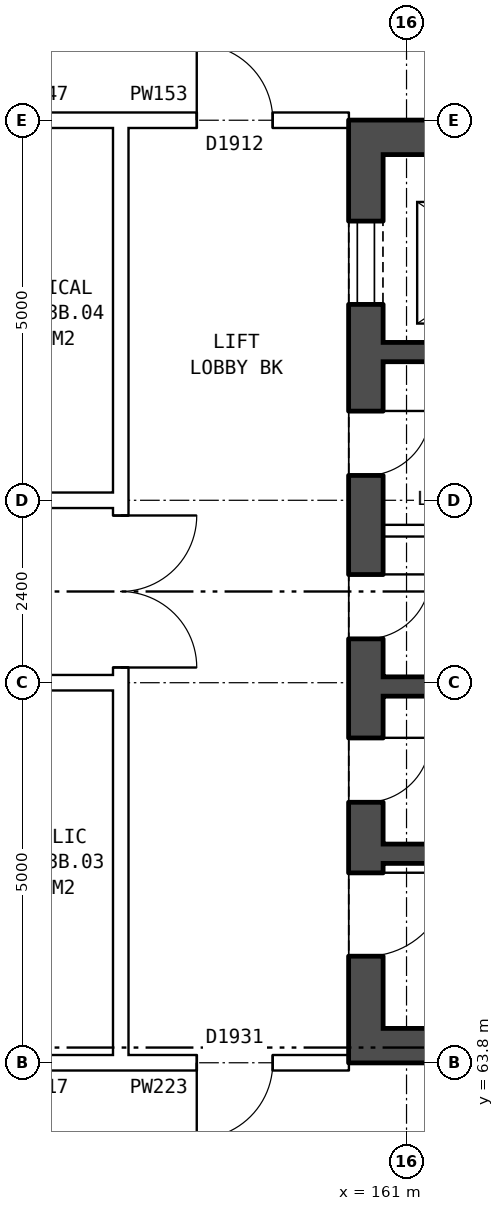
"""IFC4 building model, lengths in metres.
Left out: names, types, materials, properties, quantities, classifications, styles, units other than length and angle.
Written with IfcOpenShell. Run it as: python <this file> out.ifc"""

import sys

from ifc_helpers import new_model, si_unit, direction, frame, frame_2d, origin, place, context, subcontext, project, spatial, rectangle, extrude, element, fill, save


model = new_model("IFC4")
c1 = context("Model", 3, precision=1e-05, world=origin(), true_north=direction((0.0, 1.0)))
c2 = subcontext(c1, "Body", "Model", "MODEL_VIEW")
j1 = project(units=[si_unit("LENGTHUNIT", "METRE"), si_unit("PLANEANGLEUNIT", "RADIAN")], contexts=[c1])
p1 = place(None, origin())
s1 = spatial("IfcSite", under=j1, at=p1, CompositionType="ELEMENT")
p2 = place(p1, origin())
s2 = spatial("IfcBuilding", under=s1, at=p2, CompositionType="ELEMENT")
p3 = place(p2, frame((0.0, 0.0, 188.2)))
s3 = spatial("IfcBuildingStorey", under=s2, at=p3, CompositionType="ELEMENT", Elevation=188.2)
p4 = place(p3, frame((160.465, 76.2, 0.0), z_axis=(0.0, 0.0, 1.0), x_axis=(0.0, -1.0, 0.0)))
e1 = element("IfcWall", 1, at=p4, inside=s3, PredefinedType="SHEAR", context=c2, shape_type="SweptSolid", body=[
    extrude(rectangle(XDim=12.4, YDim=0.45, at=frame_2d((6.2, 0.0))), origin(), (0.0, 0.0, 1.0), 2.85),
])
p5 = place(p4, frame((1.325, 0.0, 0.0)))
e2 = element("IfcOpeningElement", 2, at=p5, cuts=e1, PredefinedType="OPENING", context=c2, shape_type="SweptSolid", body=[
    extrude(rectangle(XDim=1.1, YDim=2.1, at=frame_2d((0.55, 1.05))), frame((0.0, 0.235, 0.0), z_axis=(0.0, -1.0, 0.0), x_axis=(1.0, 0.0, 0.0)), (0.0, 0.0, 1.0), 0.47),
])
p6 = place(p4, frame((3.825, 0.0, 0.0)))
e3 = element("IfcOpeningElement", 3, at=p6, cuts=e1, PredefinedType="OPENING", context=c2, shape_type="SweptSolid", body=[
    extrude(rectangle(XDim=0.85, YDim=2.1, at=frame_2d((0.425, 1.05))), frame((0.0, 0.235, 0.0), z_axis=(0.0, -1.0, 0.0), x_axis=(1.0, 0.0, 0.0)), (0.0, 0.0, 1.0), 0.47),
])
p7 = place(p4, frame((5.975, 0.0, 0.0)))
e4 = element("IfcOpeningElement", 4, at=p7, cuts=e1, PredefinedType="OPENING", context=c2, shape_type="SweptSolid", body=[
    extrude(rectangle(XDim=0.85, YDim=2.1, at=frame_2d((0.425, 1.05))), frame((0.0, 0.235, 0.0), z_axis=(0.0, -1.0, 0.0), x_axis=(1.0, 0.0, 0.0)), (0.0, 0.0, 1.0), 0.47),
])
p8 = place(p4, frame((9.9, 0.0, 0.0)))
e5 = element("IfcOpeningElement", 5, at=p8, cuts=e1, PredefinedType="OPENING", context=c2, shape_type="SweptSolid", body=[
    extrude(rectangle(XDim=1.1, YDim=2.1, at=frame_2d((0.55, 1.05))), frame((0.0, 0.235, 0.0), z_axis=(0.0, -1.0, 0.0), x_axis=(1.0, 0.0, 0.0)), (0.0, 0.0, 1.0), 0.47),
])
p9 = place(p4, frame((8.125, 0.0, 0.0)))
e6 = element("IfcOpeningElement", 6, at=p9, cuts=e1, PredefinedType="OPENING", context=c2, shape_type="SweptSolid", body=[
    extrude(rectangle(XDim=0.85, YDim=2.1, at=frame_2d((0.425, 1.05))), frame((0.0, 0.235, 0.0), z_axis=(0.0, -1.0, 0.0), x_axis=(1.0, 0.0, 0.0)), (0.0, 0.0, 1.0), 0.47),
])
for number, where, z_axis, x_axis in (
    (7, (160.69, 75.975, 0.0), (0.0, 0.0, 1.0), (1.0, 0.0, 0.0)),
    (8, (160.69, 64.025, 0.0), (0.0, 0.0, 1.0), (1.0, 0.0, 0.0)),
):
    element("IfcWall", number, at=place(p3, frame(where, z_axis=z_axis, x_axis=x_axis)), inside=s3, PredefinedType="SHEAR", context=c2, shape_type="SweptSolid", body=[
        extrude(rectangle(XDim=7.5, YDim=0.45, at=frame_2d((3.75, 0.0))), origin(), (0.0, 0.0, 1.0), 2.85),
    ])
p10 = place(p3, frame((160.69, 73.15, 0.0), z_axis=(0.0, 0.0, 1.0), x_axis=(1.0, 0.0, 0.0)))
e9 = element("IfcWall", 9, at=p10, inside=s3, PredefinedType="SHEAR", context=c2, shape_type="SweptSolid", body=[
    extrude(rectangle(XDim=4.675, YDim=0.25, at=frame_2d((2.337, 0.0))), origin(), (0.0, 0.0, 1.0), 2.85),
])
p11 = place(p3, frame((160.69, 70.8, 0.0), z_axis=(0.0, 0.0, 1.0), x_axis=(1.0, 0.0, 0.0)))
e10 = element("IfcWall", 10, at=p11, inside=s3, PredefinedType="PARTITIONING", context=c2, shape_type="SweptSolid", body=[
    extrude(rectangle(XDim=2.475, YDim=0.15, at=frame_2d((1.238, 0.0))), origin(), (0.0, 0.0, 1.0), 2.85),
])
p12 = place(p3, frame((160.69, 68.75, 0.0), z_axis=(0.0, 0.0, 1.0), x_axis=(1.0, 0.0, 0.0)))
e11 = element("IfcWall", 11, at=p12, inside=s3, PredefinedType="SHEAR", context=c2, shape_type="SweptSolid", body=[
    extrude(rectangle(XDim=7.5, YDim=0.25, at=frame_2d((3.75, 0.0))), origin(), (0.0, 0.0, 1.0), 2.85),
])
p13 = place(p12, frame((5.075, 0.0, 0.0)))
e12 = element("IfcOpeningElement", 12, at=p13, cuts=e11, PredefinedType="OPENING", context=c2, shape_type="SweptSolid", body=[
    extrude(rectangle(XDim=1.1, YDim=2.1, at=frame_2d((0.55, 1.05))), frame((0.0, 0.135, 0.0), z_axis=(0.0, -1.0, 0.0), x_axis=(1.0, 0.0, 0.0)), (0.0, 0.0, 1.0), 0.27),
])
p14 = place(p12, frame((3.275, 0.0, 0.0)))
e13 = element("IfcOpeningElement", 13, at=p14, cuts=e11, PredefinedType="OPENING", context=c2, shape_type="SweptSolid", body=[
    extrude(rectangle(XDim=0.85, YDim=2.1, at=frame_2d((0.425, 1.05))), frame((0.0, 0.135, 0.0), z_axis=(0.0, -1.0, 0.0), x_axis=(1.0, 0.0, 0.0)), (0.0, 0.0, 1.0), 0.27),
])
p15 = place(p3, frame((160.69, 66.55, 0.0), z_axis=(0.0, 0.0, 1.0), x_axis=(1.0, 0.0, 0.0)))
e14 = element("IfcWall", 14, at=p15, inside=s3, PredefinedType="SHEAR", context=c2, shape_type="SweptSolid", body=[
    extrude(rectangle(XDim=2.475, YDim=0.25, at=frame_2d((1.238, 0.0))), origin(), (0.0, 0.0, 1.0), 2.85),
])
p16 = place(p3, frame((157.24, 63.9, 0.0), z_axis=(0.0, 0.0, 1.0), x_axis=(0.0, 1.0, 0.0)))
e15 = element("IfcWall", 15, at=p16, inside=s3, PredefinedType="PARTITIONING", context=c2, shape_type="SweptSolid", body=[
    extrude(rectangle(XDim=12.2, YDim=0.2, at=frame_2d((6.1, 0.0))), origin(), (0.0, 0.0, 1.0), 2.85),
])
p17 = place(p16, frame((5.1, 0.0, 0.0)))
e16 = element("IfcOpeningElement", 16, at=p17, cuts=e15, PredefinedType="OPENING", context=c2, shape_type="SweptSolid", body=[
    extrude(rectangle(XDim=2.0, YDim=2.1, at=frame_2d((1.0, 1.05))), frame((0.0, 0.11, 0.0), z_axis=(0.0, -1.0, 0.0), x_axis=(1.0, 0.0, 0.0)), (0.0, 0.0, 1.0), 0.22),
])
p18 = place(p3, frame((155.1, 63.8, 0.0), z_axis=(0.0, 0.0, 1.0), x_axis=(1.0, 0.0, 0.0)))
e17 = element("IfcWall", 17, at=p18, inside=s3, PredefinedType="PARTITIONING", context=c2, shape_type="SweptSolid", body=[
    extrude(rectangle(XDim=2.14, YDim=0.2, at=frame_2d((1.07, 0.0))), origin(), (0.0, 0.0, 1.0), 2.85),
])
p19 = place(p3, frame((157.24, 63.8, 0.0), z_axis=(0.0, 0.0, 1.0), x_axis=(1.0, 0.0, 0.0)))
e18 = element("IfcWall", 18, at=p19, inside=s3, PredefinedType="PARTITIONING", context=c2, shape_type="SweptSolid", body=[
    extrude(rectangle(XDim=3.0, YDim=0.2, at=frame_2d((1.5, 0.0))), origin(), (0.0, 0.0, 1.0), 2.85),
])
p20 = place(p19, frame((1.0, 0.0, 0.0)))
e19 = element("IfcOpeningElement", 19, at=p20, cuts=e18, PredefinedType="OPENING", context=c2, shape_type="SweptSolid", body=[
    extrude(rectangle(XDim=1.0, YDim=2.1, at=frame_2d((0.5, 1.05))), frame((0.0, 0.11, 0.0), z_axis=(0.0, -1.0, 0.0), x_axis=(1.0, 0.0, 0.0)), (0.0, 0.0, 1.0), 0.22),
])
p21 = place(p3, frame((142.76, 68.8, 0.0), z_axis=(0.0, 0.0, 1.0), x_axis=(1.0, 0.0, 0.0)))
e20 = element("IfcWall", 20, at=p21, inside=s3, PredefinedType="PARTITIONING", context=c2, shape_type="SweptSolid", body=[
    extrude(rectangle(XDim=14.48, YDim=0.2, at=frame_2d((7.24, 0.0))), origin(), (0.0, 0.0, 1.0), 2.85),
])
p22 = place(p21, frame((1.12, 0.0, 0.0)))
e21 = element("IfcOpeningElement", 21, at=p22, cuts=e20, PredefinedType="OPENING", context=c2, shape_type="SweptSolid", body=[
    extrude(rectangle(XDim=1.0, YDim=2.1, at=frame_2d((0.5, 1.05))), frame((0.0, 0.11, 0.0), z_axis=(0.0, -1.0, 0.0), x_axis=(1.0, 0.0, 0.0)), (0.0, 0.0, 1.0), 0.22),
])
p23 = place(p21, frame((7.24, 0.0, 0.0)))
e22 = element("IfcOpeningElement", 22, at=p23, cuts=e20, PredefinedType="OPENING", context=c2, shape_type="SweptSolid", body=[
    extrude(rectangle(XDim=1.0, YDim=2.1, at=frame_2d((0.5, 1.05))), frame((0.0, 0.11, 0.0), z_axis=(0.0, -1.0, 0.0), x_axis=(1.0, 0.0, 0.0)), (0.0, 0.0, 1.0), 0.22),
])
p24 = place(p3, frame((142.76, 71.2, 0.0), z_axis=(0.0, 0.0, 1.0), x_axis=(1.0, 0.0, 0.0)))
e23 = element("IfcWall", 23, at=p24, inside=s3, PredefinedType="PARTITIONING", context=c2, shape_type="SweptSolid", body=[
    extrude(rectangle(XDim=14.48, YDim=0.2, at=frame_2d((7.24, 0.0))), origin(), (0.0, 0.0, 1.0), 2.85),
])
p25 = place(p24, frame((4.24, 0.0, 0.0)))
e24 = element("IfcOpeningElement", 24, at=p25, cuts=e23, PredefinedType="OPENING", context=c2, shape_type="SweptSolid", body=[
    extrude(rectangle(XDim=1.0, YDim=2.1, at=frame_2d((0.5, 1.05))), frame((0.0, 0.11, 0.0), z_axis=(0.0, -1.0, 0.0), x_axis=(1.0, 0.0, 0.0)), (0.0, 0.0, 1.0), 0.22),
])
p26 = place(p24, frame((7.24, 0.0, 0.0)))
e25 = element("IfcOpeningElement", 25, at=p26, cuts=e23, PredefinedType="OPENING", context=c2, shape_type="SweptSolid", body=[
    extrude(rectangle(XDim=1.0, YDim=2.1, at=frame_2d((0.5, 1.05))), frame((0.0, 0.11, 0.0), z_axis=(0.0, -1.0, 0.0), x_axis=(1.0, 0.0, 0.0)), (0.0, 0.0, 1.0), 0.22),
])
p27 = place(p3, frame((155.1, 76.2, 0.0), z_axis=(0.0, 0.0, 1.0), x_axis=(1.0, 0.0, 0.0)))
e26 = element("IfcWall", 26, at=p27, inside=s3, PredefinedType="PARTITIONING", context=c2, shape_type="SweptSolid", body=[
    extrude(rectangle(XDim=2.14, YDim=0.2, at=frame_2d((1.07, 0.0))), origin(), (0.0, 0.0, 1.0), 2.85),
])
p28 = place(p3, frame((157.24, 76.2, 0.0), z_axis=(0.0, 0.0, 1.0), x_axis=(1.0, 0.0, 0.0)))
e27 = element("IfcWall", 27, at=p28, inside=s3, PredefinedType="PARTITIONING", context=c2, shape_type="SweptSolid", body=[
    extrude(rectangle(XDim=3.0, YDim=0.2, at=frame_2d((1.5, 0.0))), origin(), (0.0, 0.0, 1.0), 2.85),
])
p29 = place(p28, frame((1.0, 0.0, 0.0)))
e28 = element("IfcOpeningElement", 28, at=p29, cuts=e27, PredefinedType="OPENING", context=c2, shape_type="SweptSolid", body=[
    extrude(rectangle(XDim=1.0, YDim=2.1, at=frame_2d((0.5, 1.05))), frame((0.0, 0.11, 0.0), z_axis=(0.0, -1.0, 0.0), x_axis=(1.0, 0.0, 0.0)), (0.0, 0.0, 1.0), 0.22),
])
p30 = place(p5, origin())
e29 = element("IfcDoor", 29, at=p30, inside=s3, OperationType="DOUBLE_DOOR_SLIDING", PredefinedType="DOOR", context=c2, shape_type="SweptSolid", body=[
    extrude(rectangle(XDim=1.1, YDim=2.1, at=frame_2d((0.55, 1.05))), frame((0.0, 0.21, 0.0), z_axis=(0.0, -1.0, 0.0), x_axis=(1.0, 0.0, 0.0)), (0.0, 0.0, 1.0), 0.05),
])
fill(e2, e29)
p31 = place(p6, origin())
e30 = element("IfcDoor", 30, at=p31, inside=s3, OperationType="SINGLE_SWING_LEFT", PredefinedType="DOOR", context=c2, shape_type="SweptSolid", body=[
    extrude(rectangle(XDim=0.85, YDim=2.1, at=frame_2d((0.425, 1.05))), frame((0.0, 0.21, 0.0), z_axis=(0.0, -1.0, 0.0), x_axis=(1.0, 0.0, 0.0)), (0.0, 0.0, 1.0), 0.05),
])
fill(e3, e30)
p32 = place(p7, origin())
e31 = element("IfcDoor", 31, at=p32, inside=s3, OperationType="SINGLE_SWING_LEFT", PredefinedType="DOOR", context=c2, shape_type="SweptSolid", body=[
    extrude(rectangle(XDim=0.85, YDim=2.1, at=frame_2d((0.425, 1.05))), frame((0.0, 0.21, 0.0), z_axis=(0.0, -1.0, 0.0), x_axis=(1.0, 0.0, 0.0)), (0.0, 0.0, 1.0), 0.05),
])
fill(e4, e31)
p33 = place(p8, origin())
e32 = element("IfcDoor", 32, at=p33, inside=s3, OperationType="SINGLE_SWING_LEFT", PredefinedType="DOOR", context=c2, shape_type="SweptSolid", body=[
    extrude(rectangle(XDim=1.1, YDim=2.1, at=frame_2d((0.55, 1.05))), frame((0.0, 0.21, 0.0), z_axis=(0.0, -1.0, 0.0), x_axis=(1.0, 0.0, 0.0)), (0.0, 0.0, 1.0), 0.05),
])
fill(e5, e32)
p34 = place(p9, origin())
e33 = element("IfcDoor", 33, at=p34, inside=s3, OperationType="SINGLE_SWING_LEFT", PredefinedType="DOOR", context=c2, shape_type="SweptSolid", body=[
    extrude(rectangle(XDim=0.85, YDim=2.1, at=frame_2d((0.425, 1.05))), frame((0.0, 0.21, 0.0), z_axis=(0.0, -1.0, 0.0), x_axis=(1.0, 0.0, 0.0)), (0.0, 0.0, 1.0), 0.05),
])
fill(e6, e33)
p35 = place(p17, frame((2.0, 0.0, 0.0), z_axis=(0.0, 0.0, 1.0), x_axis=(-1.0, 0.0, 0.0)))
e34 = element("IfcDoor", 34, at=p35, inside=s3, OperationType="DOUBLE_DOOR_SINGLE_SWING", PredefinedType="DOOR", context=c2, shape_type="SweptSolid", body=[
    extrude(rectangle(XDim=2.0, YDim=2.1, at=frame_2d((1.0, 1.05))), frame((0.0, 0.025, 0.0), z_axis=(0.0, -1.0, 0.0), x_axis=(1.0, 0.0, 0.0)), (0.0, 0.0, 1.0), 0.05),
])
fill(e16, e34)
p36 = place(p20, frame((1.0, 0.0, 0.0), z_axis=(0.0, 0.0, 1.0), x_axis=(-1.0, 0.0, 0.0)))
e35 = element("IfcDoor", 35, at=p36, inside=s3, OperationType="SINGLE_SWING_RIGHT", PredefinedType="DOOR", context=c2, shape_type="SweptSolid", body=[
    extrude(rectangle(XDim=1.0, YDim=2.1, at=frame_2d((0.5, 1.05))), frame((0.0, 0.025, 0.0), z_axis=(0.0, -1.0, 0.0), x_axis=(1.0, 0.0, 0.0)), (0.0, 0.0, 1.0), 0.05),
])
fill(e19, e35)
p37 = place(p29, origin())
e36 = element("IfcDoor", 36, at=p37, inside=s3, OperationType="SINGLE_SWING_LEFT", PredefinedType="DOOR", context=c2, shape_type="SweptSolid", body=[
    extrude(rectangle(XDim=1.0, YDim=2.1, at=frame_2d((0.5, 1.05))), frame((0.0, 0.025, 0.0), z_axis=(0.0, -1.0, 0.0), x_axis=(1.0, 0.0, 0.0)), (0.0, 0.0, 1.0), 0.05),
])
fill(e28, e36)
save(model, sys.argv[1])
